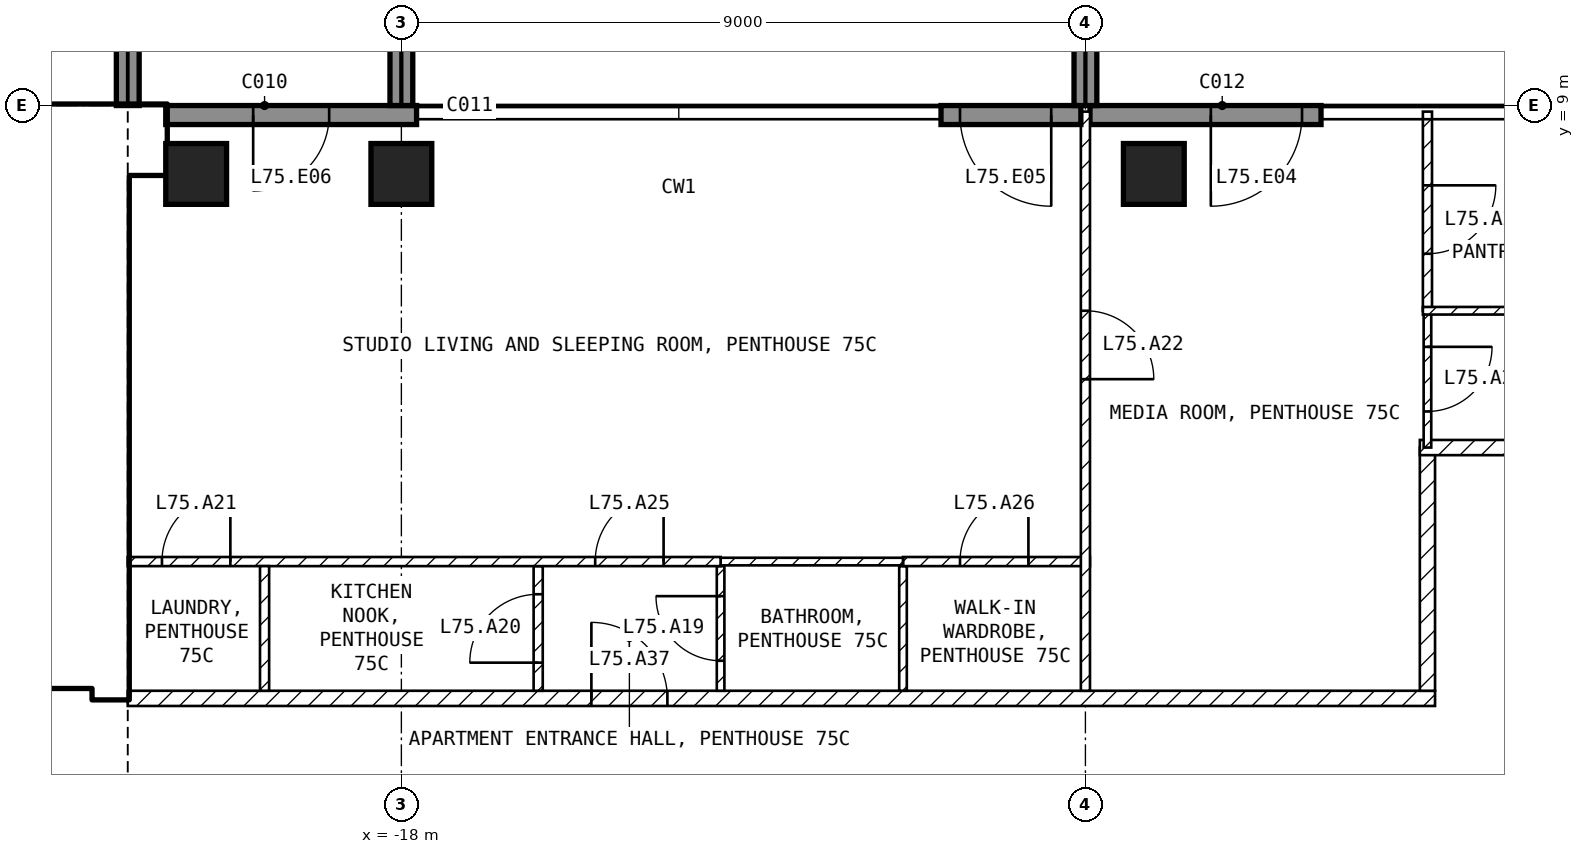
"""IFC4 building model, lengths in metres.
Left out: names, types, materials, properties, quantities, classifications, styles, units other than length and angle.
Written with IfcOpenShell. Run it as: python <this file> out.ifc"""

import sys

from ifc_helpers import new_model, si_unit, direction, frame, frame_2d, origin, origin_2d, place, context, subcontext, project, spatial, rectangle, extrude, element, fill, save


model = new_model("IFC4")
c1 = context("Model", 3, precision=1e-05, world=origin(), true_north=direction((0.0, 1.0)))
c2 = subcontext(c1, "Body", "Model", "MODEL_VIEW")
j1 = project(units=[si_unit("LENGTHUNIT", "METRE"), si_unit("PLANEANGLEUNIT", "RADIAN")], contexts=[c1])
p1 = place(None, origin())
s1 = spatial("IfcSite", under=j1, at=p1, CompositionType="ELEMENT")
p2 = place(p1, origin())
s2 = spatial("IfcBuilding", under=s1, at=p2, CompositionType="ELEMENT")
p3 = place(p2, frame((0.0, 0.0, 294.6)))
s3 = spatial("IfcBuildingStorey", under=s2, at=p3, CompositionType="ELEMENT", Elevation=294.6)
for number, where, z_axis, x_axis in (
    (1, (-20.7, 8.1, -0.25), (0.0, 0.0, 1.0), (1.0, 0.0, 0.0)),
    (2, (-18.0, 8.1, -0.25), (0.0, 0.0, 1.0), (1.0, 0.0, 0.0)),
    (3, (-8.1, 8.1, -0.25), (0.0, 0.0, 1.0), (1.0, 0.0, 0.0)),
):
    element("IfcColumn", number, at=place(p3, frame(where, z_axis=z_axis, x_axis=x_axis)), inside=s3, PredefinedType="COLUMN", context=c2, shape_type="SweptSolid", body=[
        extrude(rectangle(XDim=0.8, YDim=0.8, at=origin_2d()), origin(), (0.0, 0.0, 1.0), 4.2),
    ])
p4 = place(p3, frame((-5.9, 8.875, 0.0), z_axis=(0.0, 0.0, 1.0), x_axis=(-1.0, 0.0, 0.0)))
e4 = element("IfcWall", 4, at=p4, inside=s3, PredefinedType="SOLIDWALL", context=c2, shape_type="SweptSolid", body=[
    extrude(rectangle(XDim=3.04, YDim=0.25, at=frame_2d((1.52, 0.0))), origin(), (0.0, 0.0, 1.0), 3.95),
])
p5 = place(p4, frame((0.25, 0.0, 0.0)))
e5 = element("IfcOpeningElement", 5, at=p5, cuts=e4, PredefinedType="OPENING", context=c2, shape_type="SweptSolid", body=[
    extrude(rectangle(XDim=1.2, YDim=2.4, at=frame_2d((0.6, 1.2))), frame((0.0, 0.135, 0.0), z_axis=(0.0, -1.0, 0.0), x_axis=(1.0, 0.0, 0.0)), (0.0, 0.0, 1.0), 0.27),
])
p6 = place(p3, frame((-9.06, 8.875, 0.0), z_axis=(0.0, 0.0, 1.0), x_axis=(-1.0, 0.0, 0.0)))
e6 = element("IfcWall", 6, at=p6, inside=s3, PredefinedType="SOLIDWALL", context=c2, shape_type="SweptSolid", body=[
    extrude(rectangle(XDim=1.84, YDim=0.25, at=frame_2d((0.92, 0.0))), origin(), (0.0, 0.0, 1.0), 3.95),
])
p7 = place(p6, frame((0.39, 0.0, 0.0)))
e7 = element("IfcOpeningElement", 7, at=p7, cuts=e6, PredefinedType="OPENING", context=c2, shape_type="SweptSolid", body=[
    extrude(rectangle(XDim=1.2, YDim=2.4, at=frame_2d((0.6, 1.2))), frame((0.0, 0.135, 0.0), z_axis=(0.0, -1.0, 0.0), x_axis=(1.0, 0.0, 0.0)), (0.0, 0.0, 1.0), 0.27),
])
p8 = place(p3, frame((-17.8, 8.875, 0.0), z_axis=(0.0, 0.0, 1.0), x_axis=(-1.0, 0.0, 0.0)))
e8 = element("IfcWall", 8, at=p8, inside=s3, PredefinedType="SOLIDWALL", context=c2, shape_type="SweptSolid", body=[
    extrude(rectangle(XDim=3.3, YDim=0.25, at=frame_2d((1.65, 0.0))), origin(), (0.0, 0.0, 1.0), 3.95),
])
p9 = place(p8, frame((1.15, 0.0, 0.0)))
e9 = element("IfcOpeningElement", 9, at=p9, cuts=e8, PredefinedType="OPENING", context=c2, shape_type="SweptSolid", body=[
    extrude(rectangle(XDim=1.0, YDim=2.4, at=frame_2d((0.5, 1.2))), frame((0.0, 0.135, 0.0), z_axis=(0.0, -1.0, 0.0), x_axis=(1.0, 0.0, 0.0)), (0.0, 0.0, 1.0), 0.27),
])
for number, where, z_axis, x_axis in (
    (10, (-21.6, 9.0, 0.0), (0.0, 0.0, 1.0), (0.0, 1.0, 0.0)),
    (11, (-18.0, 9.0, 0.0), (0.0, 0.0, 1.0), (0.0, 1.0, 0.0)),
    (12, (-9.0, 9.0, 0.0), (0.0, 0.0, 1.0), (0.0, 1.0, 0.0)),
):
    element("IfcWall", number, at=place(p3, frame(where, z_axis=z_axis, x_axis=x_axis)), inside=s3, PredefinedType="SOLIDWALL", context=c2, shape_type="SweptSolid", body=[
        extrude(rectangle(XDim=2.7, YDim=0.3, at=frame_2d((1.35, 0.0))), origin(), (0.0, 0.0, 1.0), 3.95),
    ])
p10 = place(p3, frame((-29.75, 8.55, 0.0), z_axis=(0.0, 0.0, 1.0), x_axis=(1.0, 0.0, 0.0)))
e13 = element("IfcWall", 13, at=p10, inside=s3, PredefinedType="SHEAR", context=c2, shape_type="SweptSolid", body=[
    extrude(rectangle(XDim=8.65, YDim=0.9, at=frame_2d((4.325, 0.0))), origin(), (0.0, 0.0, 1.0), 3.95),
])
p11 = place(p3, frame((-21.825, 1.2, 0.0), z_axis=(0.0, 0.0, 1.0), x_axis=(0.0, 1.0, 0.0)))
e14 = element("IfcWall", 14, at=p11, inside=s3, PredefinedType="SHEAR", context=c2, shape_type="SweptSolid", body=[
    extrude(rectangle(XDim=6.9, YDim=0.45, at=frame_2d((3.45, 0.0))), origin(), (0.0, 0.0, 1.0), 3.95),
])
p12 = place(p3, frame((-33.35, 1.45, 0.0), z_axis=(0.0, 0.0, 1.0), x_axis=(1.0, 0.0, 0.0)))
e15 = element("IfcWall", 15, at=p12, inside=s3, PredefinedType="SOLIDWALL", context=c2, shape_type="SweptSolid", body=[
    extrude(rectangle(XDim=11.3, YDim=0.2, at=frame_2d((5.65, 0.0))), origin(), (0.0, 0.0, 1.0), 3.95),
])
p13 = place(p12, frame((9.55, 0.0, 0.0)))
e16 = element("IfcOpeningElement", 16, at=p13, cuts=e15, PredefinedType="OPENING", context=c2, shape_type="SweptSolid", body=[
    extrude(rectangle(XDim=1.0, YDim=2.1, at=frame_2d((0.5, 1.05))), frame((0.0, 0.11, 0.0), z_axis=(0.0, -1.0, 0.0), x_axis=(1.0, 0.0, 0.0)), (0.0, 0.0, 1.0), 0.22),
])
p14 = place(p12, frame((7.05, 0.0, 0.0)))
e17 = element("IfcOpeningElement", 17, at=p14, cuts=e15, PredefinedType="OPENING", context=c2, shape_type="SweptSolid", body=[
    extrude(rectangle(XDim=1.0, YDim=2.1, at=frame_2d((0.5, 1.05))), frame((0.0, 0.11, 0.0), z_axis=(0.0, -1.0, 0.0), x_axis=(1.0, 0.0, 0.0)), (0.0, 0.0, 1.0), 0.22),
])
p15 = place(p12, frame((1.175, 0.0, 0.0)))
e18 = element("IfcOpeningElement", 18, at=p15, cuts=e15, PredefinedType="OPENING", context=c2, shape_type="SweptSolid", body=[
    extrude(rectangle(XDim=0.9, YDim=2.1, at=frame_2d((0.45, 1.05))), frame((0.0, 0.11, 0.0), z_axis=(0.0, -1.0, 0.0), x_axis=(1.0, 0.0, 0.0)), (0.0, 0.0, 1.0), 0.22),
])
p16 = place(p3, frame((-28.35, 5.15, 0.0), z_axis=(0.0, 0.0, 1.0), x_axis=(1.0, 0.0, 0.0)))
e19 = element("IfcWall", 19, at=p16, inside=s3, PredefinedType="SOLIDWALL", context=c2, shape_type="SweptSolid", body=[
    extrude(rectangle(XDim=6.3, YDim=0.2, at=frame_2d((3.15, 0.0))), origin(), (0.0, 0.0, 1.0), 3.95),
])
p17 = place(p16, frame((5.1, 0.0, 0.0)))
e20 = element("IfcOpeningElement", 20, at=p17, cuts=e19, PredefinedType="OPENING", context=c2, shape_type="SweptSolid", body=[
    extrude(rectangle(XDim=1.0, YDim=2.1, at=frame_2d((0.5, 1.05))), frame((0.0, 0.11, 0.0), z_axis=(0.0, -1.0, 0.0), x_axis=(1.0, 0.0, 0.0)), (0.0, 0.0, 1.0), 0.22),
])
p18 = place(p3, frame((-21.6, 1.2, 0.0), z_axis=(0.0, 0.0, 1.0), x_axis=(1.0, 0.0, 0.0)))
e21 = element("IfcWall", 21, at=p18, inside=s3, PredefinedType="PARTITIONING", context=c2, shape_type="SweptSolid", body=[
    extrude(rectangle(XDim=17.2, YDim=0.2, at=frame_2d((8.6, 0.0))), origin(), (0.0, 0.0, 1.0), 3.95),
])
p19 = place(p18, frame((6.1, 0.0, 0.0)))
e22 = element("IfcOpeningElement", 22, at=p19, cuts=e21, PredefinedType="OPENING", context=c2, shape_type="SweptSolid", body=[
    extrude(rectangle(XDim=1.0, YDim=2.1, at=frame_2d((0.5, 1.05))), frame((0.0, 0.11, 0.0), z_axis=(0.0, -1.0, 0.0), x_axis=(1.0, 0.0, 0.0)), (0.0, 0.0, 1.0), 0.22),
])
p20 = place(p3, frame((-4.5, 1.3, 0.0), z_axis=(0.0, 0.0, 1.0), x_axis=(0.0, 1.0, 0.0)))
e23 = element("IfcWall", 23, at=p20, inside=s3, PredefinedType="PARTITIONING", context=c2, shape_type="SweptSolid", body=[
    extrude(rectangle(XDim=3.2, YDim=0.2, at=frame_2d((1.6, 0.0))), origin(), (0.0, 0.0, 1.0), 3.95),
])
p21 = place(p3, frame((-4.6, 4.5, 0.0), z_axis=(0.0, 0.0, 1.0), x_axis=(1.0, 0.0, 0.0)))
e24 = element("IfcWall", 24, at=p21, inside=s3, PredefinedType="PARTITIONING", context=c2, shape_type="SweptSolid", body=[
    extrude(rectangle(XDim=3.5, YDim=0.2, at=frame_2d((1.75, 0.0))), origin(), (0.0, 0.0, 1.0), 3.95),
])
p22 = place(p3, frame((-11.4, 1.3, 0.0), z_axis=(0.0, 0.0, 1.0), x_axis=(0.0, 1.0, 0.0)))
e25 = element("IfcWall", 25, at=p22, inside=s3, PredefinedType="PARTITIONING", context=c2, shape_type="SweptSolid", body=[
    extrude(rectangle(XDim=1.64, YDim=0.1, at=frame_2d((0.82, 0.0))), origin(), (0.0, 0.0, 1.0), 3.95),
])
p23 = place(p3, frame((-11.4, 3.0, 0.0), z_axis=(0.0, 0.0, 1.0), x_axis=(1.0, 0.0, 0.0)))
e26 = element("IfcWall", 26, at=p23, inside=s3, PredefinedType="PARTITIONING", context=c2, shape_type="SweptSolid", body=[
    extrude(rectangle(XDim=2.46, YDim=0.12, at=frame_2d((1.23, 0.0))), origin(), (0.0, 0.0, 1.0), 3.95),
])
p24 = place(p23, frame((0.75, 0.0, 0.0)))
e27 = element("IfcOpeningElement", 27, at=p24, cuts=e26, PredefinedType="OPENING", context=c2, shape_type="SweptSolid", body=[
    extrude(rectangle(XDim=0.9, YDim=2.1, at=frame_2d((0.45, 1.05))), frame((0.0, 0.07, 0.0), z_axis=(0.0, -1.0, 0.0), x_axis=(1.0, 0.0, 0.0)), (0.0, 0.0, 1.0), 0.14),
])
p25 = place(p3, frame((-9.0, 8.92, 0.0), z_axis=(0.0, 0.0, 1.0), x_axis=(0.0, -1.0, 0.0)))
e28 = element("IfcWall", 28, at=p25, inside=s3, PredefinedType="PARTITIONING", context=c2, shape_type="SweptSolid", body=[
    extrude(rectangle(XDim=7.62, YDim=0.12, at=frame_2d((3.81, 0.0))), origin(), (0.0, 0.0, 1.0), 3.95),
])
p26 = place(p25, frame((2.62, 0.0, 0.0)))
e29 = element("IfcOpeningElement", 29, at=p26, cuts=e28, PredefinedType="OPENING", context=c2, shape_type="SweptSolid", body=[
    extrude(rectangle(XDim=0.9, YDim=2.1, at=frame_2d((0.45, 1.05))), frame((0.0, 0.07, 0.0), z_axis=(0.0, -1.0, 0.0), x_axis=(1.0, 0.0, 0.0)), (0.0, 0.0, 1.0), 0.14),
])
p27 = place(p3, frame((-13.8, 1.3, 0.0), z_axis=(0.0, 0.0, 1.0), x_axis=(0.0, 1.0, 0.0)))
e30 = element("IfcWall", 30, at=p27, inside=s3, PredefinedType="PARTITIONING", context=c2, shape_type="SweptSolid", body=[
    extrude(rectangle(XDim=1.64, YDim=0.1, at=frame_2d((0.82, 0.0))), origin(), (0.0, 0.0, 1.0), 3.95),
])
p28 = place(p27, frame((0.395, 0.0, 0.0)))
e31 = element("IfcOpeningElement", 31, at=p28, cuts=e30, PredefinedType="OPENING", context=c2, shape_type="SweptSolid", body=[
    extrude(rectangle(XDim=0.85, YDim=2.1, at=frame_2d((0.425, 1.05))), frame((0.0, 0.06, 0.0), z_axis=(0.0, -1.0, 0.0), x_axis=(1.0, 0.0, 0.0)), (0.0, 0.0, 1.0), 0.12),
])
p29 = place(p3, frame((-13.8, 3.0, 0.0), z_axis=(0.0, 0.0, 1.0), x_axis=(1.0, 0.0, 0.0)))
e32 = element("IfcWall", 32, at=p29, inside=s3, PredefinedType="PARTITIONING", context=c2, shape_type="SweptSolid", body=[
    extrude(rectangle(XDim=2.4, YDim=0.1, at=frame_2d((1.2, 0.0))), origin(), (0.0, 0.0, 1.0), 3.95),
])
p30 = place(p3, frame((-16.2, 1.3, 0.0), z_axis=(0.0, 0.0, 1.0), x_axis=(0.0, 1.0, 0.0)))
e33 = element("IfcWall", 33, at=p30, inside=s3, PredefinedType="PARTITIONING", context=c2, shape_type="SweptSolid", body=[
    extrude(rectangle(XDim=1.64, YDim=0.12, at=frame_2d((0.82, 0.0))), origin(), (0.0, 0.0, 1.0), 3.95),
])
p31 = place(p30, frame((0.37, 0.0, 0.0)))
e34 = element("IfcOpeningElement", 34, at=p31, cuts=e33, PredefinedType="OPENING", context=c2, shape_type="SweptSolid", body=[
    extrude(rectangle(XDim=0.9, YDim=2.1, at=frame_2d((0.45, 1.05))), frame((0.0, 0.07, 0.0), z_axis=(0.0, -1.0, 0.0), x_axis=(1.0, 0.0, 0.0)), (0.0, 0.0, 1.0), 0.14),
])
p32 = place(p3, frame((-21.6, 3.0, 0.0), z_axis=(0.0, 0.0, 1.0), x_axis=(1.0, 0.0, 0.0)))
e35 = element("IfcWall", 35, at=p32, inside=s3, PredefinedType="PARTITIONING", context=c2, shape_type="SweptSolid", body=[
    extrude(rectangle(XDim=7.8, YDim=0.12, at=frame_2d((3.9, 0.0))), origin(), (0.0, 0.0, 1.0), 3.95),
])
p33 = place(p32, frame((0.45, 0.0, 0.0)))
e36 = element("IfcOpeningElement", 36, at=p33, cuts=e35, PredefinedType="OPENING", context=c2, shape_type="SweptSolid", body=[
    extrude(rectangle(XDim=0.9, YDim=2.1, at=frame_2d((0.45, 1.05))), frame((0.0, 0.07, 0.0), z_axis=(0.0, -1.0, 0.0), x_axis=(1.0, 0.0, 0.0)), (0.0, 0.0, 1.0), 0.14),
])
p34 = place(p32, frame((6.15, 0.0, 0.0)))
e37 = element("IfcOpeningElement", 37, at=p34, cuts=e35, PredefinedType="OPENING", context=c2, shape_type="SweptSolid", body=[
    extrude(rectangle(XDim=0.9, YDim=2.1, at=frame_2d((0.45, 1.05))), frame((0.0, 0.07, 0.0), z_axis=(0.0, -1.0, 0.0), x_axis=(1.0, 0.0, 0.0)), (0.0, 0.0, 1.0), 0.14),
])
p35 = place(p3, frame((-19.8, 1.3, 0.0), z_axis=(0.0, 0.0, 1.0), x_axis=(0.0, 1.0, 0.0)))
e38 = element("IfcWall", 38, at=p35, inside=s3, PredefinedType="PARTITIONING", context=c2, shape_type="SweptSolid", body=[
    extrude(rectangle(XDim=1.64, YDim=0.12, at=frame_2d((0.82, 0.0))), origin(), (0.0, 0.0, 1.0), 3.95),
])
p36 = place(p3, frame((-4.5, 6.3, 0.0), z_axis=(0.0, 0.0, 1.0), x_axis=(0.0, -1.0, 0.0)))
e39 = element("IfcWall", 39, at=p36, inside=s3, PredefinedType="PARTITIONING", context=c2, shape_type="SweptSolid", body=[
    extrude(rectangle(XDim=1.8, YDim=0.1, at=frame_2d((0.9, 0.0))), origin(), (0.0, 0.0, 1.0), 3.95),
])
p37 = place(p36, frame((0.475, 0.0, 0.0)))
e40 = element("IfcOpeningElement", 40, at=p37, cuts=e39, PredefinedType="OPENING", context=c2, shape_type="SweptSolid", body=[
    extrude(rectangle(XDim=0.85, YDim=2.1, at=frame_2d((0.425, 1.05))), frame((0.0, 0.06, 0.0), z_axis=(0.0, -1.0, 0.0), x_axis=(1.0, 0.0, 0.0)), (0.0, 0.0, 1.0), 0.12),
])
p38 = place(p3, frame((-4.5, 8.92, 0.0), z_axis=(0.0, 0.0, 1.0), x_axis=(0.0, -1.0, 0.0)))
e41 = element("IfcWall", 41, at=p38, inside=s3, PredefinedType="PARTITIONING", context=c2, shape_type="SweptSolid", body=[
    extrude(rectangle(XDim=2.62, YDim=0.12, at=frame_2d((1.31, 0.0))), origin(), (0.0, 0.0, 1.0), 3.95),
])
p39 = place(p38, frame((0.97, 0.0, 0.0)))
e42 = element("IfcOpeningElement", 42, at=p39, cuts=e41, PredefinedType="OPENING", context=c2, shape_type="SweptSolid", body=[
    extrude(rectangle(XDim=0.9, YDim=2.1, at=frame_2d((0.45, 1.05))), frame((0.0, 0.07, 0.0), z_axis=(0.0, -1.0, 0.0), x_axis=(1.0, 0.0, 0.0)), (0.0, 0.0, 1.0), 0.14),
])
p40 = place(p3, frame((-4.56, 6.3, 0.0), z_axis=(0.0, 0.0, 1.0), x_axis=(1.0, 0.0, 0.0)))
e43 = element("IfcWall", 43, at=p40, inside=s3, PredefinedType="PARTITIONING", context=c2, shape_type="SweptSolid", body=[
    extrude(rectangle(XDim=3.46, YDim=0.1, at=frame_2d((1.73, 0.0))), origin(), (0.0, 0.0, 1.0), 3.95),
])
p41 = place(p5, origin())
e44 = element("IfcDoor", 44, at=p41, inside=s3, OperationType="SINGLE_SWING_RIGHT", PredefinedType="DOOR", context=c2, shape_type="SweptSolid", body=[
    extrude(rectangle(XDim=1.2, YDim=2.4, at=frame_2d((0.6, 1.2))), frame((0.0, 0.025, 0.0), z_axis=(0.0, -1.0, 0.0), x_axis=(1.0, 0.0, 0.0)), (0.0, 0.0, 1.0), 0.05),
])
fill(e5, e44)
p42 = place(p7, origin())
e45 = element("IfcDoor", 45, at=p42, inside=s3, OperationType="SINGLE_SWING_LEFT", PredefinedType="DOOR", context=c2, shape_type="SweptSolid", body=[
    extrude(rectangle(XDim=1.2, YDim=2.4, at=frame_2d((0.6, 1.2))), frame((0.0, 0.025, 0.0), z_axis=(0.0, -1.0, 0.0), x_axis=(1.0, 0.0, 0.0)), (0.0, 0.0, 1.0), 0.05),
])
fill(e7, e45)
p43 = place(p9, origin())
e46 = element("IfcDoor", 46, at=p43, inside=s3, OperationType="SINGLE_SWING_RIGHT", PredefinedType="DOOR", context=c2, shape_type="SweptSolid", body=[
    extrude(rectangle(XDim=1.0, YDim=2.4, at=frame_2d((0.5, 1.2))), frame((0.0, 0.025, 0.0), z_axis=(0.0, -1.0, 0.0), x_axis=(1.0, 0.0, 0.0)), (0.0, 0.0, 1.0), 0.05),
])
fill(e9, e46)
p44 = place(p17, origin())
e47 = element("IfcDoor", 47, at=p44, inside=s3, OperationType="SINGLE_SWING_LEFT", PredefinedType="DOOR", context=c2, shape_type="SweptSolid", body=[
    extrude(rectangle(XDim=1.0, YDim=2.1, at=frame_2d((0.5, 1.05))), frame((0.0, 0.025, 0.0), z_axis=(0.0, -1.0, 0.0), x_axis=(1.0, 0.0, 0.0)), (0.0, 0.0, 1.0), 0.05),
])
fill(e20, e47)
p45 = place(p28, origin())
e48 = element("IfcDoor", 48, at=p45, inside=s3, OperationType="SINGLE_SWING_RIGHT", PredefinedType="DOOR", context=c2, shape_type="SweptSolid", body=[
    extrude(rectangle(XDim=0.85, YDim=2.1, at=frame_2d((0.425, 1.05))), frame((0.0, 0.025, 0.0), z_axis=(0.0, -1.0, 0.0), x_axis=(1.0, 0.0, 0.0)), (0.0, 0.0, 1.0), 0.05),
])
fill(e31, e48)
p46 = place(p31, origin())
e49 = element("IfcDoor", 49, at=p46, inside=s3, OperationType="SINGLE_SWING_LEFT", PredefinedType="DOOR", context=c2, shape_type="SweptSolid", body=[
    extrude(rectangle(XDim=0.9, YDim=2.1, at=frame_2d((0.45, 1.05))), frame((0.0, 0.025, 0.0), z_axis=(0.0, -1.0, 0.0), x_axis=(1.0, 0.0, 0.0)), (0.0, 0.0, 1.0), 0.05),
])
fill(e34, e49)
p47 = place(p33, origin())
e50 = element("IfcDoor", 50, at=p47, inside=s3, OperationType="SINGLE_SWING_RIGHT", PredefinedType="DOOR", context=c2, shape_type="SweptSolid", body=[
    extrude(rectangle(XDim=0.9, YDim=2.1, at=frame_2d((0.45, 1.05))), frame((0.0, 0.025, 0.0), z_axis=(0.0, -1.0, 0.0), x_axis=(1.0, 0.0, 0.0)), (0.0, 0.0, 1.0), 0.05),
])
fill(e36, e50)
p48 = place(p26, origin())
e51 = element("IfcDoor", 51, at=p48, inside=s3, OperationType="SINGLE_SWING_RIGHT", PredefinedType="DOOR", context=c2, shape_type="SweptSolid", body=[
    extrude(rectangle(XDim=0.9, YDim=2.1, at=frame_2d((0.45, 1.05))), frame((0.0, 0.025, 0.0), z_axis=(0.0, -1.0, 0.0), x_axis=(1.0, 0.0, 0.0)), (0.0, 0.0, 1.0), 0.05),
])
fill(e29, e51)
p49 = place(p39, origin())
e52 = element("IfcDoor", 52, at=p49, inside=s3, OperationType="SINGLE_SWING_LEFT", PredefinedType="DOOR", context=c2, shape_type="SweptSolid", body=[
    extrude(rectangle(XDim=0.9, YDim=2.1, at=frame_2d((0.45, 1.05))), frame((0.0, 0.025, 0.0), z_axis=(0.0, -1.0, 0.0), x_axis=(1.0, 0.0, 0.0)), (0.0, 0.0, 1.0), 0.05),
])
fill(e42, e52)
p50 = place(p37, origin())
e53 = element("IfcDoor", 53, at=p50, inside=s3, OperationType="SINGLE_SWING_LEFT", PredefinedType="DOOR", context=c2, shape_type="SweptSolid", body=[
    extrude(rectangle(XDim=0.85, YDim=2.1, at=frame_2d((0.425, 1.05))), frame((0.0, 0.025, 0.0), z_axis=(0.0, -1.0, 0.0), x_axis=(1.0, 0.0, 0.0)), (0.0, 0.0, 1.0), 0.05),
])
fill(e40, e53)
p51 = place(p34, origin())
e54 = element("IfcDoor", 54, at=p51, inside=s3, OperationType="SINGLE_SWING_RIGHT", PredefinedType="DOOR", context=c2, shape_type="SweptSolid", body=[
    extrude(rectangle(XDim=0.9, YDim=2.1, at=frame_2d((0.45, 1.05))), frame((0.0, 0.025, 0.0), z_axis=(0.0, -1.0, 0.0), x_axis=(1.0, 0.0, 0.0)), (0.0, 0.0, 1.0), 0.05),
])
fill(e37, e54)
p52 = place(p24, origin())
e55 = element("IfcDoor", 55, at=p52, inside=s3, OperationType="SINGLE_SWING_RIGHT", PredefinedType="DOOR", context=c2, shape_type="SweptSolid", body=[
    extrude(rectangle(XDim=0.9, YDim=2.1, at=frame_2d((0.45, 1.05))), frame((0.0, 0.025, 0.0), z_axis=(0.0, -1.0, 0.0), x_axis=(1.0, 0.0, 0.0)), (0.0, 0.0, 1.0), 0.05),
])
fill(e27, e55)
p53 = place(p19, origin())
e56 = element("IfcDoor", 56, at=p53, inside=s3, OperationType="SINGLE_SWING_LEFT", PredefinedType="DOOR", context=c2, shape_type="SweptSolid", body=[
    extrude(rectangle(XDim=1.0, YDim=2.1, at=frame_2d((0.5, 1.05))), frame((0.0, 0.025, 0.0), z_axis=(0.0, -1.0, 0.0), x_axis=(1.0, 0.0, 0.0)), (0.0, 0.0, 1.0), 0.05),
])
fill(e22, e56)
save(model, sys.argv[1])
